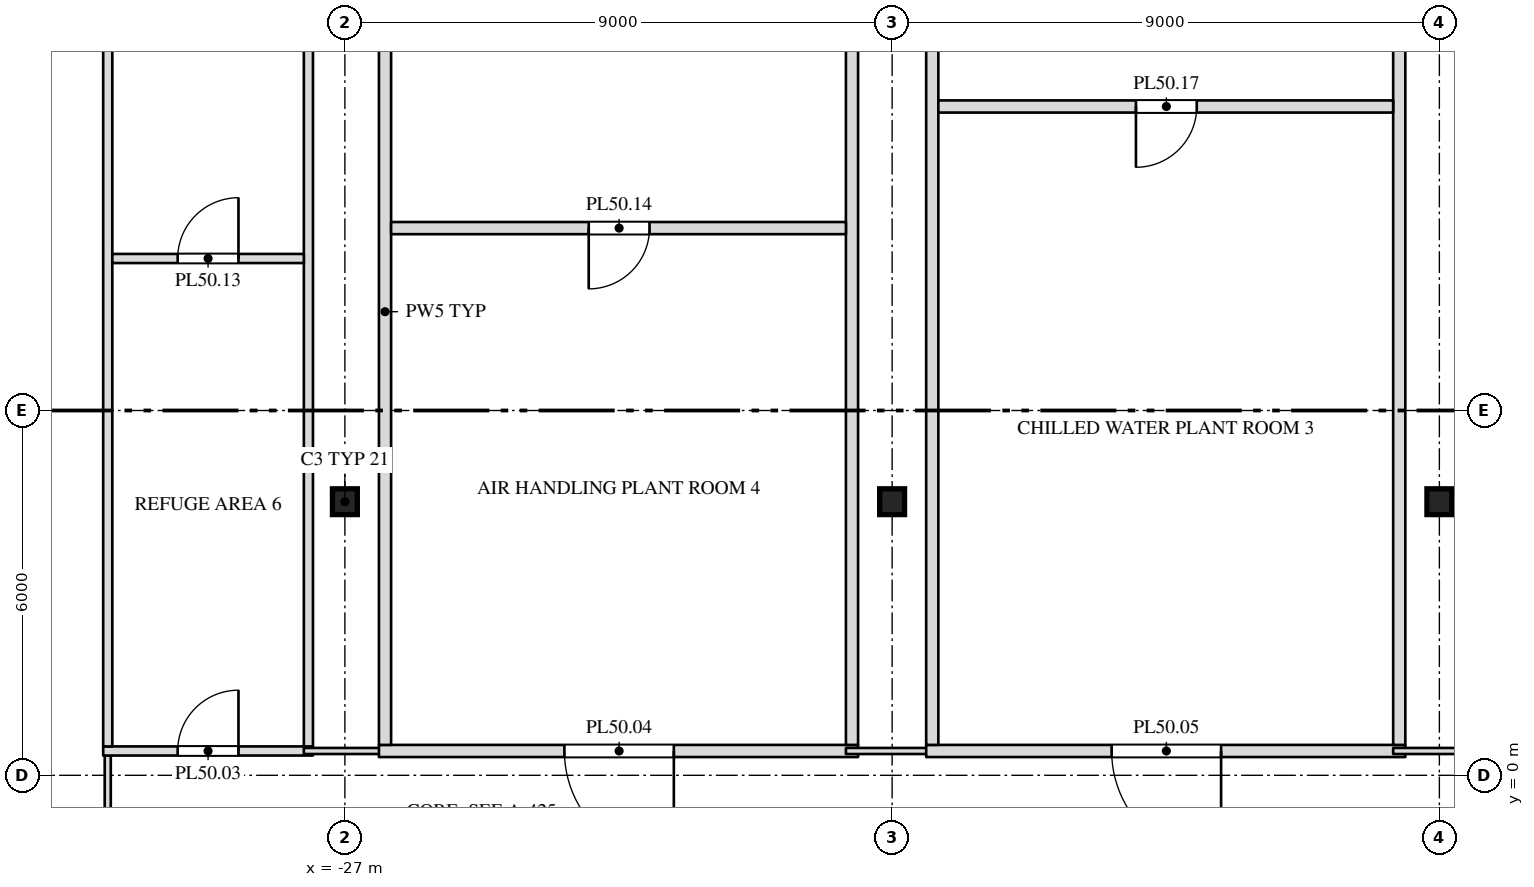
"""IFC4 building model, lengths in metres.
Left out: names, types, materials, properties, quantities, classifications, styles, units other than length and angle.
Written with IfcOpenShell. Run it as: python <this file> out.ifc"""

import sys

from ifc_helpers import new_model, si_unit, direction, frame, frame_2d, origin, origin_2d, place, context, subcontext, project, spatial, rectangle, i_section, extrude, element, fill, save


model = new_model("IFC4")
c1 = context("Model", 3, precision=1e-05, world=origin(), true_north=direction((0.0, 1.0)))
c2 = subcontext(c1, "Body", "Model", "MODEL_VIEW")
j1 = project(units=[si_unit("LENGTHUNIT", "METRE"), si_unit("PLANEANGLEUNIT", "RADIAN")], contexts=[c1])
p1 = place(None, origin())
s1 = spatial("IfcSite", under=j1, at=p1, CompositionType="ELEMENT")
p2 = place(p1, origin())
s2 = spatial("IfcBuilding", under=s1, at=p2, CompositionType="ELEMENT")
p3 = place(p2, frame((0.0, 0.0, 216.5)))
s3 = spatial("IfcBuildingStorey", under=s2, at=p3, CompositionType="ELEMENT", Elevation=216.5)
for number, where, z_axis, x_axis in (
    (1, (-27.0, 4.5, 0.0), (0.0, 0.0, 1.0), (1.0, 0.0, 0.0)),
    (2, (-18.0, 4.5, 0.0), (0.0, 0.0, 1.0), (1.0, 0.0, 0.0)),
    (3, (-9.0, 4.5, 0.0), (0.0, 0.0, 1.0), (1.0, 0.0, 0.0)),
):
    element("IfcColumn", number, at=place(p3, frame(where, z_axis=z_axis, x_axis=x_axis)), inside=s3, PredefinedType="COLUMN", context=c2, shape_type="SweptSolid", body=[
        extrude(i_section(OverallWidth=0.409, OverallDepth=0.424, WebThickness=0.033, FlangeThickness=0.052, at=origin_2d()), origin(), (0.0, 0.0, 1.0), 4.0),
    ])
p4 = place(p3, frame((-30.9, -1.925, 0.0), z_axis=(0.0, 0.0, 1.0), x_axis=(0.0, 1.0, 0.0)))
e4 = element("IfcWall", 4, at=p4, inside=s3, PredefinedType="PARTITIONING", context=c2, shape_type="SweptSolid", body=[
    extrude(rectangle(XDim=2.25, YDim=0.1, at=frame_2d((1.125, 0.0))), origin(), (0.0, 0.0, 1.0), 3.8),
])
p5 = place(p3, frame((-30.975, 0.4, 0.0), z_axis=(0.0, 0.0, 1.0), x_axis=(1.0, 0.0, 0.0)))
e5 = element("IfcWall", 5, at=p5, inside=s3, PredefinedType="PARTITIONING", context=c2, shape_type="SweptSolid", body=[
    extrude(rectangle(XDim=3.45, YDim=0.15, at=frame_2d((1.725, 0.0))), origin(), (0.0, 0.0, 1.0), 3.8),
])
p6 = place(p5, frame((1.225, 0.0, 0.0)))
e6 = element("IfcOpeningElement", 6, at=p6, cuts=e5, PredefinedType="OPENING", context=c2, shape_type="SweptSolid", body=[
    extrude(rectangle(XDim=1.0, YDim=2.1, at=frame_2d((0.5, 1.05))), frame((0.0, 0.087, 0.0), z_axis=(0.0, -1.0, 0.0), x_axis=(1.0, 0.0, 0.0)), (0.0, 0.0, 1.0), 0.174),
])
p7 = place(p3, frame((-30.9, 0.475, 0.0), z_axis=(0.0, 0.0, 1.0), x_axis=(0.0, 1.0, 0.0)))
e7 = element("IfcWall", 7, at=p7, inside=s3, PredefinedType="PARTITIONING", context=c2, shape_type="SweptSolid", body=[
    extrude(rectangle(XDim=27.465, YDim=0.15, at=frame_2d((13.732, 0.0))), origin(), (0.0, 0.0, 1.0), 3.8),
])
p8 = place(p3, frame((-27.675, 0.4, 0.0), z_axis=(0.0, 0.0, 1.0), x_axis=(1.0, 0.0, 0.0)))
e8 = element("IfcWall", 8, at=p8, inside=s3, PredefinedType="PARTITIONING", context=c2, shape_type="SweptSolid", body=[
    extrude(rectangle(XDim=1.435, YDim=0.1, at=frame_2d((0.718, 0.0))), origin(), (0.0, 0.0, 1.0), 3.8),
])
p9 = place(p3, frame((-27.6, 0.475, 0.0), z_axis=(0.0, 0.0, 1.0), x_axis=(0.0, 1.0, 0.0)))
e9 = element("IfcWall", 9, at=p9, inside=s3, PredefinedType="PARTITIONING", context=c2, shape_type="SweptSolid", body=[
    extrude(rectangle(XDim=28.505, YDim=0.15, at=frame_2d((14.252, 0.0))), origin(), (0.0, 0.0, 1.0), 3.8),
])
p10 = place(p3, frame((-26.44, 0.4, 0.0), z_axis=(0.0, 0.0, 1.0), x_axis=(1.0, 0.0, 0.0)))
e10 = element("IfcWall", 10, at=p10, inside=s3, PredefinedType="PARTITIONING", context=c2, shape_type="SweptSolid", body=[
    extrude(rectangle(XDim=7.88, YDim=0.2, at=frame_2d((3.94, 0.0))), origin(), (0.0, 0.0, 1.0), 3.8),
])
p11 = place(p10, frame((3.05, 0.0, 0.0)))
e11 = element("IfcOpeningElement", 11, at=p11, cuts=e10, PredefinedType="OPENING", context=c2, shape_type="SweptSolid", body=[
    extrude(rectangle(XDim=1.8, YDim=2.1, at=frame_2d((0.9, 1.05))), frame((0.0, 0.112, 0.0), z_axis=(0.0, -1.0, 0.0), x_axis=(1.0, 0.0, 0.0)), (0.0, 0.0, 1.0), 0.224),
])
p12 = place(p3, frame((-26.34, 0.5, 0.0), z_axis=(0.0, 0.0, 1.0), x_axis=(0.0, 1.0, 0.0)))
e12 = element("IfcWall", 12, at=p12, inside=s3, PredefinedType="PARTITIONING", context=c2, shape_type="SweptSolid", body=[
    extrude(rectangle(XDim=28.5, YDim=0.2, at=frame_2d((14.25, 0.0))), origin(), (0.0, 0.0, 1.0), 3.8),
])
p13 = place(p3, frame((-18.76, 0.4, 0.0), z_axis=(0.0, 0.0, 1.0), x_axis=(1.0, 0.0, 0.0)))
e13 = element("IfcWall", 13, at=p13, inside=s3, PredefinedType="PARTITIONING", context=c2, shape_type="SweptSolid", body=[
    extrude(rectangle(XDim=1.52, YDim=0.1, at=frame_2d((0.76, 0.0))), origin(), (0.0, 0.0, 1.0), 3.8),
])
p14 = place(p3, frame((-18.66, 0.5, 0.0), z_axis=(0.0, 0.0, 1.0), x_axis=(0.0, 1.0, 0.0)))
e14 = element("IfcWall", 14, at=p14, inside=s3, PredefinedType="PARTITIONING", context=c2, shape_type="SweptSolid", body=[
    extrude(rectangle(XDim=28.496, YDim=0.2, at=frame_2d((14.248, 0.0))), origin(), (0.0, 0.0, 1.0), 3.8),
])
p15 = place(p3, frame((-17.44, 0.4, 0.0), z_axis=(0.0, 0.0, 1.0), x_axis=(1.0, 0.0, 0.0)))
e15 = element("IfcWall", 15, at=p15, inside=s3, PredefinedType="PARTITIONING", context=c2, shape_type="SweptSolid", body=[
    extrude(rectangle(XDim=7.88, YDim=0.2, at=frame_2d((3.94, 0.0))), origin(), (0.0, 0.0, 1.0), 3.8),
])
p16 = place(p15, frame((3.05, 0.0, 0.0)))
e16 = element("IfcOpeningElement", 16, at=p16, cuts=e15, PredefinedType="OPENING", context=c2, shape_type="SweptSolid", body=[
    extrude(rectangle(XDim=1.8, YDim=2.1, at=frame_2d((0.9, 1.05))), frame((0.0, 0.112, 0.0), z_axis=(0.0, -1.0, 0.0), x_axis=(1.0, 0.0, 0.0)), (0.0, 0.0, 1.0), 0.224),
])
p17 = place(p3, frame((-17.34, 0.5, 0.0), z_axis=(0.0, 0.0, 1.0), x_axis=(0.0, 1.0, 0.0)))
e17 = element("IfcWall", 17, at=p17, inside=s3, PredefinedType="PARTITIONING", context=c2, shape_type="SweptSolid", body=[
    extrude(rectangle(XDim=28.496, YDim=0.2, at=frame_2d((14.248, 0.0))), origin(), (0.0, 0.0, 1.0), 3.8),
])
p18 = place(p3, frame((-9.76, 0.4, 0.0), z_axis=(0.0, 0.0, 1.0), x_axis=(1.0, 0.0, 0.0)))
e18 = element("IfcWall", 18, at=p18, inside=s3, PredefinedType="PARTITIONING", context=c2, shape_type="SweptSolid", body=[
    extrude(rectangle(XDim=1.52, YDim=0.1, at=frame_2d((0.76, 0.0))), origin(), (0.0, 0.0, 1.0), 3.8),
])
p19 = place(p3, frame((-9.66, 0.5, 0.0), z_axis=(0.0, 0.0, 1.0), x_axis=(0.0, 1.0, 0.0)))
e19 = element("IfcWall", 19, at=p19, inside=s3, PredefinedType="PARTITIONING", context=c2, shape_type="SweptSolid", body=[
    extrude(rectangle(XDim=28.5, YDim=0.2, at=frame_2d((14.25, 0.0))), origin(), (0.0, 0.0, 1.0), 3.8),
])
p20 = place(p3, frame((-30.825, 8.5, 0.0), z_axis=(0.0, 0.0, 1.0), x_axis=(1.0, 0.0, 0.0)))
e20 = element("IfcWall", 20, at=p20, inside=s3, PredefinedType="PARTITIONING", context=c2, shape_type="SweptSolid", body=[
    extrude(rectangle(XDim=3.15, YDim=0.15, at=frame_2d((1.575, 0.0))), origin(), (0.0, 0.0, 1.0), 3.8),
])
p21 = place(p20, frame((1.075, 0.0, 0.0)))
e21 = element("IfcOpeningElement", 21, at=p21, cuts=e20, PredefinedType="OPENING", context=c2, shape_type="SweptSolid", body=[
    extrude(rectangle(XDim=1.0, YDim=2.1, at=frame_2d((0.5, 1.05))), frame((0.0, 0.087, 0.0), z_axis=(0.0, -1.0, 0.0), x_axis=(1.0, 0.0, 0.0)), (0.0, 0.0, 1.0), 0.174),
])
p22 = place(p3, frame((-26.24, 9.0, 0.0), z_axis=(0.0, 0.0, 1.0), x_axis=(1.0, 0.0, 0.0)))
e22 = element("IfcWall", 22, at=p22, inside=s3, PredefinedType="PARTITIONING", context=c2, shape_type="SweptSolid", body=[
    extrude(rectangle(XDim=7.48, YDim=0.2, at=frame_2d((3.74, 0.0))), origin(), (0.0, 0.0, 1.0), 3.8),
])
p23 = place(p22, frame((3.25, 0.0, 0.0)))
e23 = element("IfcOpeningElement", 23, at=p23, cuts=e22, PredefinedType="OPENING", context=c2, shape_type="SweptSolid", body=[
    extrude(rectangle(XDim=1.0, YDim=2.1, at=frame_2d((0.5, 1.05))), frame((0.0, 0.112, 0.0), z_axis=(0.0, -1.0, 0.0), x_axis=(1.0, 0.0, 0.0)), (0.0, 0.0, 1.0), 0.224),
])
p24 = place(p3, frame((-17.24, 11.0, 0.0), z_axis=(0.0, 0.0, 1.0), x_axis=(1.0, 0.0, 0.0)))
e24 = element("IfcWall", 24, at=p24, inside=s3, PredefinedType="PARTITIONING", context=c2, shape_type="SweptSolid", body=[
    extrude(rectangle(XDim=7.48, YDim=0.2, at=frame_2d((3.74, 0.0))), origin(), (0.0, 0.0, 1.0), 3.8),
])
p25 = place(p24, frame((3.25, 0.0, 0.0)))
e25 = element("IfcOpeningElement", 25, at=p25, cuts=e24, PredefinedType="OPENING", context=c2, shape_type="SweptSolid", body=[
    extrude(rectangle(XDim=1.0, YDim=2.1, at=frame_2d((0.5, 1.05))), frame((0.0, 0.112, 0.0), z_axis=(0.0, -1.0, 0.0), x_axis=(1.0, 0.0, 0.0)), (0.0, 0.0, 1.0), 0.224),
])
p26 = place(p6, origin())
e26 = element("IfcDoor", 26, at=p26, inside=s3, OperationType="SINGLE_SWING_RIGHT", PredefinedType="DOOR", context=c2, shape_type="SweptSolid", body=[
    extrude(rectangle(XDim=1.0, YDim=2.1, at=frame_2d((0.5, 1.05))), frame((0.0, 0.025, 0.0), z_axis=(0.0, -1.0, 0.0), x_axis=(1.0, 0.0, 0.0)), (0.0, 0.0, 1.0), 0.05),
])
fill(e6, e26)
p27 = place(p11, origin())
e27 = element("IfcDoor", 27, at=p27, inside=s3, OperationType="DOUBLE_DOOR_SINGLE_SWING", PredefinedType="DOOR", context=c2, shape_type="SweptSolid", body=[
    extrude(rectangle(XDim=1.8, YDim=2.1, at=frame_2d((0.9, 1.05))), frame((0.0, 0.025, 0.0), z_axis=(0.0, -1.0, 0.0), x_axis=(1.0, 0.0, 0.0)), (0.0, 0.0, 1.0), 0.05),
])
fill(e11, e27)
p28 = place(p16, origin())
e28 = element("IfcDoor", 28, at=p28, inside=s3, OperationType="DOUBLE_DOOR_SINGLE_SWING", PredefinedType="DOOR", context=c2, shape_type="SweptSolid", body=[
    extrude(rectangle(XDim=1.8, YDim=2.1, at=frame_2d((0.9, 1.05))), frame((0.0, 0.025, 0.0), z_axis=(0.0, -1.0, 0.0), x_axis=(1.0, 0.0, 0.0)), (0.0, 0.0, 1.0), 0.05),
])
fill(e16, e28)
p29 = place(p21, origin())
e29 = element("IfcDoor", 29, at=p29, inside=s3, OperationType="SINGLE_SWING_RIGHT", PredefinedType="DOOR", context=c2, shape_type="SweptSolid", body=[
    extrude(rectangle(XDim=1.0, YDim=2.1, at=frame_2d((0.5, 1.05))), frame((0.0, 0.025, 0.0), z_axis=(0.0, -1.0, 0.0), x_axis=(1.0, 0.0, 0.0)), (0.0, 0.0, 1.0), 0.05),
])
fill(e21, e29)
p30 = place(p23, origin())
e30 = element("IfcDoor", 30, at=p30, inside=s3, OperationType="SINGLE_SWING_RIGHT", PredefinedType="DOOR", context=c2, shape_type="SweptSolid", body=[
    extrude(rectangle(XDim=1.0, YDim=2.1, at=frame_2d((0.5, 1.05))), frame((0.0, 0.025, 0.0), z_axis=(0.0, -1.0, 0.0), x_axis=(1.0, 0.0, 0.0)), (0.0, 0.0, 1.0), 0.05),
])
fill(e23, e30)
p31 = place(p25, origin())
e31 = element("IfcDoor", 31, at=p31, inside=s3, OperationType="SINGLE_SWING_RIGHT", PredefinedType="DOOR", context=c2, shape_type="SweptSolid", body=[
    extrude(rectangle(XDim=1.0, YDim=2.1, at=frame_2d((0.5, 1.05))), frame((0.0, 0.025, 0.0), z_axis=(0.0, -1.0, 0.0), x_axis=(1.0, 0.0, 0.0)), (0.0, 0.0, 1.0), 0.05),
])
fill(e25, e31)
save(model, sys.argv[1])
